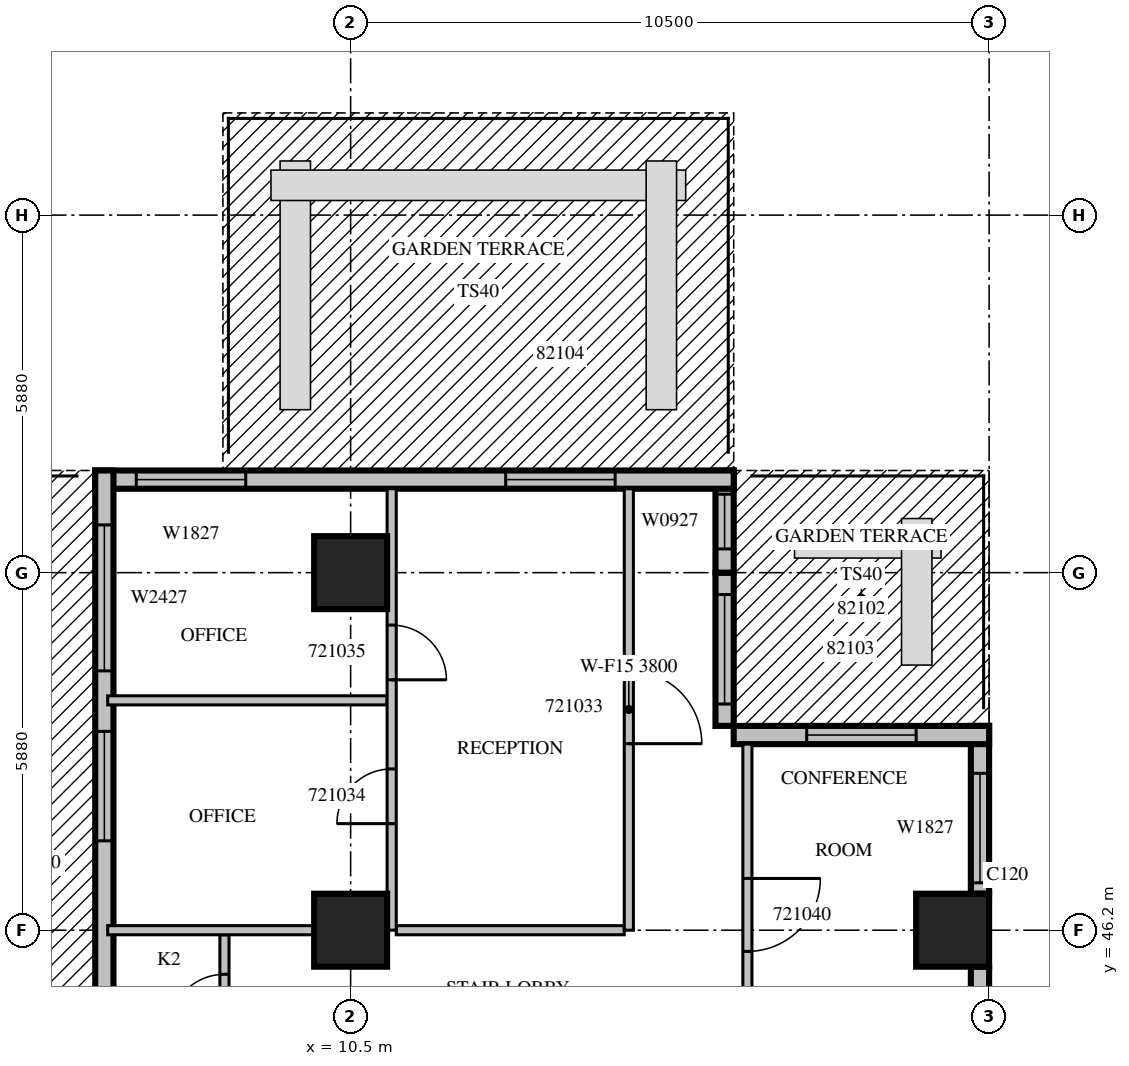
"""IFC4 building model, lengths in metres.
Left out: names, types, materials, properties, quantities, classifications, styles, units other than length and angle.
Written with IfcOpenShell. Run it as: python <this file> out.ifc"""

import sys

from ifc_helpers import new_model, si_unit, direction, frame, frame_2d, origin, origin_2d, place, context, subcontext, project, spatial, rectangle, extrude, source, transform, mapped, element, fill, save


model = new_model("IFC4")
c1 = context("Model", 3, precision=1e-05, world=origin(), true_north=direction((0.0, 1.0)))
c2 = subcontext(c1, "Body", "Model", "MODEL_VIEW")
j1 = project(units=[si_unit("LENGTHUNIT", "METRE"), si_unit("PLANEANGLEUNIT", "RADIAN")], contexts=[c1])
p1 = place(None, origin())
s1 = spatial("IfcSite", under=j1, at=p1, CompositionType="ELEMENT")
p2 = place(p1, origin())
s2 = spatial("IfcBuilding", under=s1, at=p2, CompositionType="ELEMENT")
p3 = place(p2, frame((0.0, 0.0, 99.3)))
s3 = spatial("IfcBuildingStorey", under=s2, at=p3, CompositionType="ELEMENT", Elevation=99.3)
m1 = source(origin(), c2, "Body", "SweptSolid", [
    extrude(rectangle(XDim=1.2, YDim=1.2, at=origin_2d()), origin(), (0.0, 0.0, 1.0), 4.2),
])
for number, where, z_axis, x_axis in (
    (1, (10.5, 46.2, 0.0), (0.0, 0.0, 1.0), (1.0, 0.0, 0.0)),
    (2, (20.4, 46.2, 0.0), (0.0, 0.0, 1.0), (1.0, 0.0, 0.0)),
    (3, (10.5, 52.08, 0.0), (0.0, 0.0, 1.0), (1.0, 0.0, 0.0)),
):
    element("IfcColumn", number, at=place(p3, frame(where, z_axis=z_axis, x_axis=x_axis)), inside=s3, PredefinedType="COLUMN", context=c2, shape_type="MappedRepresentation", body=[
        mapped(m1, transform((0.0, 0.0, 0.0), scale=1.0)),
    ])
m2 = source(origin(), c2, "Body", "SweptSolid", [
    extrude(rectangle(XDim=7.2, YDim=0.3, at=frame_2d((3.6, 0.0))), origin(), (0.0, 0.0, 1.0), 3.8),
])
p4 = place(p3, frame((20.85, 38.4, 0.0), z_axis=(0.0, 0.0, 1.0), x_axis=(0.0, 1.0, 0.0)))
e4 = element("IfcWall", 4, at=p4, inside=s3, PredefinedType="STANDARD", context=c2, shape_type="MappedRepresentation", body=[
    mapped(m2, transform((0.0, 0.0, 0.0), scale=1.0)),
])
m3 = source(origin(), c2, "Body", "SweptSolid", [
    extrude(rectangle(XDim=2.4, YDim=2.7, at=frame_2d((1.2, 1.35))), frame((0.0, 0.16, 0.0), z_axis=(0.0, -1.0, 0.0), x_axis=(1.0, 0.0, 0.0)), (0.0, 0.0, 1.0), 0.32),
])
p5 = place(p4, frame((0.3, 0.0, 0.6)))
e5 = element("IfcOpeningElement", 5, at=p5, cuts=e4, PredefinedType="OPENING", context=c2, shape_type="MappedRepresentation", body=[
    mapped(m3, transform((0.0, 0.0, 0.0), scale=1.0)),
])
m4 = source(origin(), c2, "Body", "SweptSolid", [
    extrude(rectangle(XDim=1.2, YDim=2.7, at=frame_2d((0.6, 1.35))), frame((0.0, 0.16, 0.0), z_axis=(0.0, -1.0, 0.0), x_axis=(1.0, 0.0, 0.0)), (0.0, 0.0, 1.0), 0.32),
])
p6 = place(p4, frame((5.521, 0.0, 0.6)))
e6 = element("IfcOpeningElement", 6, at=p6, cuts=e4, PredefinedType="OPENING", context=c2, shape_type="MappedRepresentation", body=[
    mapped(m4, transform((0.0, 0.0, 0.0), scale=1.0)),
])
m5 = source(origin(), c2, "Body", "SweptSolid", [
    extrude(rectangle(XDim=2.76, YDim=0.3, at=frame_2d((1.38, 0.0))), origin(), (0.0, 0.0, 1.0), 3.8),
])
p7 = place(p3, frame((20.85, 46.8, 0.0), z_axis=(0.0, 0.0, 1.0), x_axis=(0.0, 1.0, 0.0)))
e7 = element("IfcWall", 7, at=p7, inside=s3, PredefinedType="STANDARD", context=c2, shape_type="MappedRepresentation", body=[
    mapped(m5, transform((0.0, 0.0, 0.0), scale=1.0)),
])
m6 = source(origin(), c2, "Body", "SweptSolid", [
    extrude(rectangle(XDim=1.8, YDim=2.7, at=frame_2d((0.9, 1.35))), frame((0.0, 0.16, 0.0), z_axis=(0.0, -1.0, 0.0), x_axis=(1.0, 0.0, 0.0)), (0.0, 0.0, 1.0), 0.32),
])
p8 = place(p7, frame((0.18, 0.0, 0.6)))
e8 = element("IfcOpeningElement", 8, at=p8, cuts=e7, PredefinedType="OPENING", context=c2, shape_type="MappedRepresentation", body=[
    mapped(m6, transform((0.0, 0.0, 0.0), scale=1.0)),
])
m7 = source(origin(), c2, "Body", "SweptSolid", [
    extrude(rectangle(XDim=4.2, YDim=0.3, at=frame_2d((2.1, 0.0))), origin(), (0.0, 0.0, 1.0), 3.8),
])
p9 = place(p3, frame((21.0, 49.41, 0.0), z_axis=(0.0, 0.0, 1.0), x_axis=(-1.0, 0.0, 0.0)))
e9 = element("IfcWall", 9, at=p9, inside=s3, PredefinedType="STANDARD", context=c2, shape_type="MappedRepresentation", body=[
    mapped(m7, transform((0.0, 0.0, 0.0), scale=1.0)),
])
m8 = source(origin(), c2, "Body", "SweptSolid", [
    extrude(rectangle(XDim=1.8, YDim=2.4, at=frame_2d((0.9, 1.2))), frame((0.0, 0.16, 0.0), z_axis=(0.0, -1.0, 0.0), x_axis=(1.0, 0.0, 0.0)), (0.0, 0.0, 1.0), 0.32),
])
p10 = place(p9, frame((1.2, 0.0, 0.0)))
e10 = element("IfcOpeningElement", 10, at=p10, cuts=e9, PredefinedType="OPENING", context=c2, shape_type="MappedRepresentation", body=[
    mapped(m8, transform((0.0, 0.0, 0.0), scale=1.0)),
])
m9 = source(origin(), c2, "Body", "SweptSolid", [
    extrude(rectangle(XDim=2.52, YDim=0.3, at=frame_2d((1.26, 0.0))), origin(), (0.0, 0.0, 1.0), 3.8),
])
p11 = place(p3, frame((16.65, 49.56, 0.0), z_axis=(0.0, 0.0, 1.0), x_axis=(0.0, 1.0, 0.0)))
e11 = element("IfcWall", 11, at=p11, inside=s3, PredefinedType="STANDARD", context=c2, shape_type="MappedRepresentation", body=[
    mapped(m9, transform((0.0, 0.0, 0.0), scale=1.0)),
])
p12 = place(p11, frame((0.36, 0.0, 0.0)))
e12 = element("IfcOpeningElement", 12, at=p12, cuts=e11, PredefinedType="OPENING", context=c2, shape_type="MappedRepresentation", body=[
    mapped(m8, transform((0.0, 0.0, 0.0), scale=1.0)),
])
m10 = source(origin(), c2, "Body", "SweptSolid", [
    extrude(rectangle(XDim=1.68, YDim=0.3, at=frame_2d((0.84, 0.0))), origin(), (0.0, 0.0, 1.0), 3.8),
])
p13 = place(p3, frame((16.65, 52.08, 0.0), z_axis=(0.0, 0.0, 1.0), x_axis=(0.0, 1.0, 0.0)))
e13 = element("IfcWall", 13, at=p13, inside=s3, PredefinedType="STANDARD", context=c2, shape_type="MappedRepresentation", body=[
    mapped(m10, transform((0.0, 0.0, 0.0), scale=1.0)),
])
m11 = source(origin(), c2, "Body", "SweptSolid", [
    extrude(rectangle(XDim=0.9, YDim=2.7, at=frame_2d((0.45, 1.35))), frame((0.0, 0.16, 0.0), z_axis=(0.0, -1.0, 0.0), x_axis=(1.0, 0.0, 0.0)), (0.0, 0.0, 1.0), 0.32),
])
p14 = place(p13, frame((0.39, 0.0, 0.6)))
e14 = element("IfcOpeningElement", 14, at=p14, cuts=e13, PredefinedType="OPENING", context=c2, shape_type="MappedRepresentation", body=[
    mapped(m11, transform((0.0, 0.0, 0.0), scale=1.0)),
])
p15 = place(p3, frame((16.8, 53.61, 0.0), z_axis=(0.0, 0.0, 1.0), x_axis=(-1.0, 0.0, 0.0)))
e15 = element("IfcWall", 15, at=p15, inside=s3, PredefinedType="STANDARD", context=c2, shape_type="SweptSolid", body=[
    extrude(rectangle(XDim=10.5, YDim=0.3, at=frame_2d((5.25, 0.0))), origin(), (0.0, 0.0, 1.0), 3.8),
])
p16 = place(p15, frame((1.95, 0.0, 0.0)))
e16 = element("IfcOpeningElement", 16, at=p16, cuts=e15, PredefinedType="OPENING", context=c2, shape_type="MappedRepresentation", body=[
    mapped(m8, transform((0.0, 0.0, 0.0), scale=1.0)),
])
p17 = place(p15, frame((8.025, 0.0, 0.6)))
e17 = element("IfcOpeningElement", 17, at=p17, cuts=e15, PredefinedType="OPENING", context=c2, shape_type="MappedRepresentation", body=[
    mapped(m6, transform((0.0, 0.0, 0.0), scale=1.0)),
])
p18 = place(p3, frame((6.45, 53.76, 0.0), z_axis=(0.0, 0.0, 1.0), x_axis=(0.0, -1.0, 0.0)))
e18 = element("IfcWall", 18, at=p18, inside=s3, PredefinedType="STANDARD", context=c2, shape_type="SweptSolid", body=[
    extrude(rectangle(XDim=9.91, YDim=0.3, at=frame_2d((4.955, 0.0))), origin(), (0.0, 0.0, 1.0), 3.8),
])
p19 = place(p18, frame((4.29, 0.0, 0.0)))
e19 = element("IfcOpeningElement", 19, at=p19, cuts=e18, PredefinedType="OPENING", context=c2, shape_type="MappedRepresentation", body=[
    mapped(m8, transform((0.0, 0.0, 0.0), scale=1.0)),
])
p20 = place(p18, frame((0.895, 0.0, 0.6)))
e20 = element("IfcOpeningElement", 20, at=p20, cuts=e18, PredefinedType="OPENING", context=c2, shape_type="MappedRepresentation", body=[
    mapped(m3, transform((0.0, 0.0, 0.0), scale=1.0)),
])
m12 = source(origin(), c2, "Body", "SweptSolid", [
    extrude(rectangle(XDim=2.2, YDim=0.15, at=frame_2d((1.1, 0.0))), origin(), (0.0, 0.0, 1.0), 3.8),
])
p21 = place(p3, frame((8.425, 43.925, 0.0), z_axis=(0.0, 0.0, 1.0), x_axis=(0.0, 1.0, 0.0)))
e21 = element("IfcWall", 21, at=p21, inside=s3, PredefinedType="PARTITIONING", context=c2, shape_type="MappedRepresentation", body=[
    mapped(m12, transform((0.0, 0.0, 0.0), scale=1.0)),
])
m13 = source(origin(), c2, "Body", "SweptSolid", [
    extrude(rectangle(XDim=0.9, YDim=2.1, at=frame_2d((0.45, 1.05))), frame((0.0, 0.085, 0.0), z_axis=(0.0, -1.0, 0.0), x_axis=(1.0, 0.0, 0.0)), (0.0, 0.0, 1.0), 0.17),
])
p22 = place(p21, frame((0.65, 0.0, 0.0)))
e22 = element("IfcOpeningElement", 22, at=p22, cuts=e21, PredefinedType="OPENING", context=c2, shape_type="MappedRepresentation", body=[
    mapped(m13, transform((0.0, 0.0, 0.0), scale=1.0)),
])
p23 = place(p3, frame((11.1, 49.98, 0.0), z_axis=(0.0, 0.0, 1.0), x_axis=(-1.0, 0.0, 0.0)))
e23 = element("IfcWall", 23, at=p23, inside=s3, PredefinedType="PARTITIONING", context=c2, shape_type="SweptSolid", body=[
    extrude(rectangle(XDim=4.595, YDim=0.15, at=frame_2d((2.297, 0.0))), origin(), (0.0, 0.0, 1.0), 3.8),
])
m14 = source(origin(), c2, "Body", "SweptSolid", [
    extrude(rectangle(XDim=3.396, YDim=0.15, at=frame_2d((1.698, 0.0))), origin(), (0.0, 0.0, 1.0), 3.8),
])
p24 = place(p3, frame((9.901, 46.2, 0.0), z_axis=(0.0, 0.0, 1.0), x_axis=(-1.0, 0.0, 0.0)))
e24 = element("IfcWall", 24, at=p24, inside=s3, PredefinedType="PARTITIONING", context=c2, shape_type="MappedRepresentation", body=[
    mapped(m14, transform((0.0, 0.0, 0.0), scale=1.0)),
])
m15 = source(origin(), c2, "Body", "SweptSolid", [
    extrude(rectangle(XDim=3.75, YDim=0.15, at=frame_2d((1.875, 0.0))), origin(), (0.0, 0.0, 1.0), 3.8),
])
p25 = place(p3, frame((15.0, 46.2, 0.0), z_axis=(0.0, 0.0, 1.0), x_axis=(-1.0, 0.0, 0.0)))
e25 = element("IfcWall", 25, at=p25, inside=s3, PredefinedType="PARTITIONING", context=c2, shape_type="MappedRepresentation", body=[
    mapped(m15, transform((0.0, 0.0, 0.0), scale=1.0)),
])
p26 = place(p3, frame((11.175, 46.2, 0.0), z_axis=(0.0, 0.0, 1.0), x_axis=(0.0, 1.0, 0.0)))
e26 = element("IfcWall", 26, at=p26, inside=s3, PredefinedType="PARTITIONING", context=c2, shape_type="SweptSolid", body=[
    extrude(rectangle(XDim=7.26, YDim=0.15, at=frame_2d((3.63, 0.0))), origin(), (0.0, 0.0, 1.0), 3.8),
])
p27 = place(p26, frame((1.752, 0.0, 0.0)))
e27 = element("IfcOpeningElement", 27, at=p27, cuts=e26, PredefinedType="OPENING", context=c2, shape_type="MappedRepresentation", body=[
    mapped(m13, transform((0.0, 0.0, 0.0), scale=1.0)),
])
p28 = place(p26, frame((4.117, 0.0, 0.0)))
e28 = element("IfcOpeningElement", 28, at=p28, cuts=e26, PredefinedType="OPENING", context=c2, shape_type="MappedRepresentation", body=[
    mapped(m13, transform((0.0, 0.0, 0.0), scale=1.0)),
])
m16 = source(origin(), c2, "Body", "SweptSolid", [
    extrude(rectangle(XDim=7.26, YDim=0.15, at=frame_2d((3.63, 0.0))), origin(), (0.0, 0.0, 1.0), 3.8),
])
p29 = place(p3, frame((15.075, 46.2, 0.0), z_axis=(0.0, 0.0, 1.0), x_axis=(0.0, 1.0, 0.0)))
e29 = element("IfcWall", 29, at=p29, inside=s3, PredefinedType="PARTITIONING", context=c2, shape_type="MappedRepresentation", body=[
    mapped(m16, transform((0.0, 0.0, 0.0), scale=1.0)),
])
m17 = source(origin(), c2, "Body", "SweptSolid", [
    extrude(rectangle(XDim=1.2, YDim=2.1, at=frame_2d((0.6, 1.05))), frame((0.0, 0.085, 0.0), z_axis=(0.0, -1.0, 0.0), x_axis=(1.0, 0.0, 0.0)), (0.0, 0.0, 1.0), 0.17),
])
p30 = place(p29, frame((3.067, 0.0, 0.0)))
e30 = element("IfcOpeningElement", 30, at=p30, cuts=e29, PredefinedType="OPENING", context=c2, shape_type="MappedRepresentation", body=[
    mapped(m17, transform((0.0, 0.0, 0.0), scale=1.0)),
])
p31 = place(p3, frame((17.025, 49.26, 0.0), z_axis=(0.0, 0.0, 1.0), x_axis=(0.0, -1.0, 0.0)))
e31 = element("IfcWall", 31, at=p31, inside=s3, PredefinedType="PARTITIONING", context=c2, shape_type="SweptSolid", body=[
    extrude(rectangle(XDim=19.86, YDim=0.15, at=frame_2d((9.93, 0.0))), origin(), (0.0, 0.0, 1.0), 3.8),
])
m18 = source(origin(), c2, "Body", "SweptSolid", [
    extrude(rectangle(XDim=1.0, YDim=2.1, at=frame_2d((0.5, 1.05))), frame((0.0, 0.085, 0.0), z_axis=(0.0, -1.0, 0.0), x_axis=(1.0, 0.0, 0.0)), (0.0, 0.0, 1.0), 0.17),
])
p32 = place(p31, frame((17.503, 0.0, 0.0)))
e32 = element("IfcOpeningElement", 32, at=p32, cuts=e31, PredefinedType="OPENING", context=c2, shape_type="MappedRepresentation", body=[
    mapped(m18, transform((0.0, 0.0, 0.0), scale=1.0)),
])
p33 = place(p31, frame((14.191, 0.0, 0.0)))
e33 = element("IfcOpeningElement", 33, at=p33, cuts=e31, PredefinedType="OPENING", context=c2, shape_type="MappedRepresentation", body=[
    mapped(m18, transform((0.0, 0.0, 0.0), scale=1.0)),
])
p34 = place(p31, frame((11.848, 0.0, 0.0)))
e34 = element("IfcOpeningElement", 34, at=p34, cuts=e31, PredefinedType="OPENING", context=c2, shape_type="MappedRepresentation", body=[
    mapped(m18, transform((0.0, 0.0, 0.0), scale=1.0)),
])
p35 = place(p31, frame((7.976, 0.0, 0.0)))
e35 = element("IfcOpeningElement", 35, at=p35, cuts=e31, PredefinedType="OPENING", context=c2, shape_type="MappedRepresentation", body=[
    mapped(m17, transform((0.0, 0.0, 0.0), scale=1.0)),
])
p36 = place(p31, frame((2.209, 0.0, 0.0)))
e36 = element("IfcOpeningElement", 36, at=p36, cuts=e31, PredefinedType="OPENING", context=c2, shape_type="MappedRepresentation", body=[
    mapped(m17, transform((0.0, 0.0, 0.0), scale=1.0)),
])
m19 = source(origin(), c2, "Body", "SweptSolid", [
    extrude(rectangle(XDim=1.8, YDim=2.7, at=frame_2d((0.9, 1.35))), frame((0.0, 0.03, 0.0), z_axis=(0.0, -1.0, 0.0), x_axis=(1.0, 0.0, 0.0)), (0.0, 0.0, 1.0), 0.06),
])
p37 = place(p8, origin())
e37 = element("IfcWindow", 37, at=p37, inside=s3, PartitioningType="SINGLE_PANEL", PredefinedType="WINDOW", context=c2, shape_type="MappedRepresentation", body=[
    mapped(m19, transform((0.0, 0.0, 0.0), scale=1.0)),
])
fill(e8, e37)
m20 = source(origin(), c2, "Body", "SweptSolid", [
    extrude(rectangle(XDim=1.8, YDim=2.4, at=frame_2d((0.9, 1.2))), frame((0.0, 0.025, 0.0), z_axis=(0.0, -1.0, 0.0), x_axis=(1.0, 0.0, 0.0)), (0.0, 0.0, 1.0), 0.05),
])
p38 = place(p10, origin())
e38 = element("IfcDoor", 38, at=p38, inside=s3, OperationType="SLIDING_TO_LEFT", PredefinedType="DOOR", context=c2, shape_type="MappedRepresentation", body=[
    mapped(m20, transform((0.0, 0.0, 0.0), scale=1.0)),
])
fill(e10, e38)
p39 = place(p12, origin())
e39 = element("IfcDoor", 39, at=p39, inside=s3, OperationType="SLIDING_TO_LEFT", PredefinedType="DOOR", context=c2, shape_type="MappedRepresentation", body=[
    mapped(m20, transform((0.0, 0.0, 0.0), scale=1.0)),
])
fill(e12, e39)
m21 = source(origin(), c2, "Body", "SweptSolid", [
    extrude(rectangle(XDim=0.9, YDim=2.7, at=frame_2d((0.45, 1.35))), frame((0.0, 0.03, 0.0), z_axis=(0.0, -1.0, 0.0), x_axis=(1.0, 0.0, 0.0)), (0.0, 0.0, 1.0), 0.06),
])
p40 = place(p14, origin())
e40 = element("IfcWindow", 40, at=p40, inside=s3, PartitioningType="SINGLE_PANEL", PredefinedType="WINDOW", context=c2, shape_type="MappedRepresentation", body=[
    mapped(m21, transform((0.0, 0.0, 0.0), scale=1.0)),
])
fill(e14, e40)
p41 = place(p16, origin())
e41 = element("IfcDoor", 41, at=p41, inside=s3, OperationType="SLIDING_TO_LEFT", PredefinedType="DOOR", context=c2, shape_type="MappedRepresentation", body=[
    mapped(m20, transform((0.0, 0.0, 0.0), scale=1.0)),
])
fill(e16, e41)
p42 = place(p17, origin())
e42 = element("IfcWindow", 42, at=p42, inside=s3, PartitioningType="SINGLE_PANEL", PredefinedType="WINDOW", context=c2, shape_type="MappedRepresentation", body=[
    mapped(m19, transform((0.0, 0.0, 0.0), scale=1.0)),
])
fill(e17, e42)
p43 = place(p19, origin())
e43 = element("IfcDoor", 43, at=p43, inside=s3, OperationType="SLIDING_TO_LEFT", PredefinedType="DOOR", context=c2, shape_type="MappedRepresentation", body=[
    mapped(m20, transform((0.0, 0.0, 0.0), scale=1.0)),
])
fill(e19, e43)
m22 = source(origin(), c2, "Body", "SweptSolid", [
    extrude(rectangle(XDim=2.4, YDim=2.7, at=frame_2d((1.2, 1.35))), frame((0.0, 0.03, 0.0), z_axis=(0.0, -1.0, 0.0), x_axis=(1.0, 0.0, 0.0)), (0.0, 0.0, 1.0), 0.06),
])
p44 = place(p20, origin())
e44 = element("IfcWindow", 44, at=p44, inside=s3, PartitioningType="SINGLE_PANEL", PredefinedType="WINDOW", context=c2, shape_type="MappedRepresentation", body=[
    mapped(m22, transform((0.0, 0.0, 0.0), scale=1.0)),
])
fill(e20, e44)
m23 = source(origin(), c2, "Body", "SweptSolid", [
    extrude(rectangle(XDim=0.9, YDim=2.1, at=frame_2d((0.45, 1.05))), frame((0.0, 0.025, 0.0), z_axis=(0.0, -1.0, 0.0), x_axis=(1.0, 0.0, 0.0)), (0.0, 0.0, 1.0), 0.05),
])
p45 = place(p22, origin())
e45 = element("IfcDoor", 45, at=p45, inside=s3, OperationType="SINGLE_SWING_LEFT", PredefinedType="DOOR", context=c2, shape_type="MappedRepresentation", body=[
    mapped(m23, transform((0.0, 0.0, 0.0), scale=1.0)),
])
fill(e22, e45)
m24 = source(origin(), c2, "Body", "SweptSolid", [
    extrude(rectangle(XDim=1.2, YDim=2.1, at=frame_2d((0.6, 1.05))), frame((0.0, 0.025, 0.0), z_axis=(0.0, -1.0, 0.0), x_axis=(1.0, 0.0, 0.0)), (0.0, 0.0, 1.0), 0.05),
])
p46 = place(p30, origin())
e46 = element("IfcDoor", 46, at=p46, inside=s3, OperationType="SINGLE_SWING_RIGHT", PredefinedType="DOOR", context=c2, shape_type="MappedRepresentation", body=[
    mapped(m24, transform((0.0, 0.0, 0.0), scale=1.0)),
])
fill(e30, e46)
p47 = place(p27, origin())
e47 = element("IfcDoor", 47, at=p47, inside=s3, OperationType="SINGLE_SWING_LEFT", PredefinedType="DOOR", context=c2, shape_type="MappedRepresentation", body=[
    mapped(m23, transform((0.0, 0.0, 0.0), scale=1.0)),
])
fill(e27, e47)
p48 = place(p28, origin())
e48 = element("IfcDoor", 48, at=p48, inside=s3, OperationType="SINGLE_SWING_RIGHT", PredefinedType="DOOR", context=c2, shape_type="MappedRepresentation", body=[
    mapped(m23, transform((0.0, 0.0, 0.0), scale=1.0)),
])
fill(e28, e48)
p49 = place(p36, origin())
e49 = element("IfcDoor", 49, at=p49, inside=s3, OperationType="SINGLE_SWING_LEFT", PredefinedType="DOOR", context=c2, shape_type="MappedRepresentation", body=[
    mapped(m24, transform((0.0, 0.0, 0.0), scale=1.0)),
])
fill(e36, e49)
save(model, sys.argv[1])
